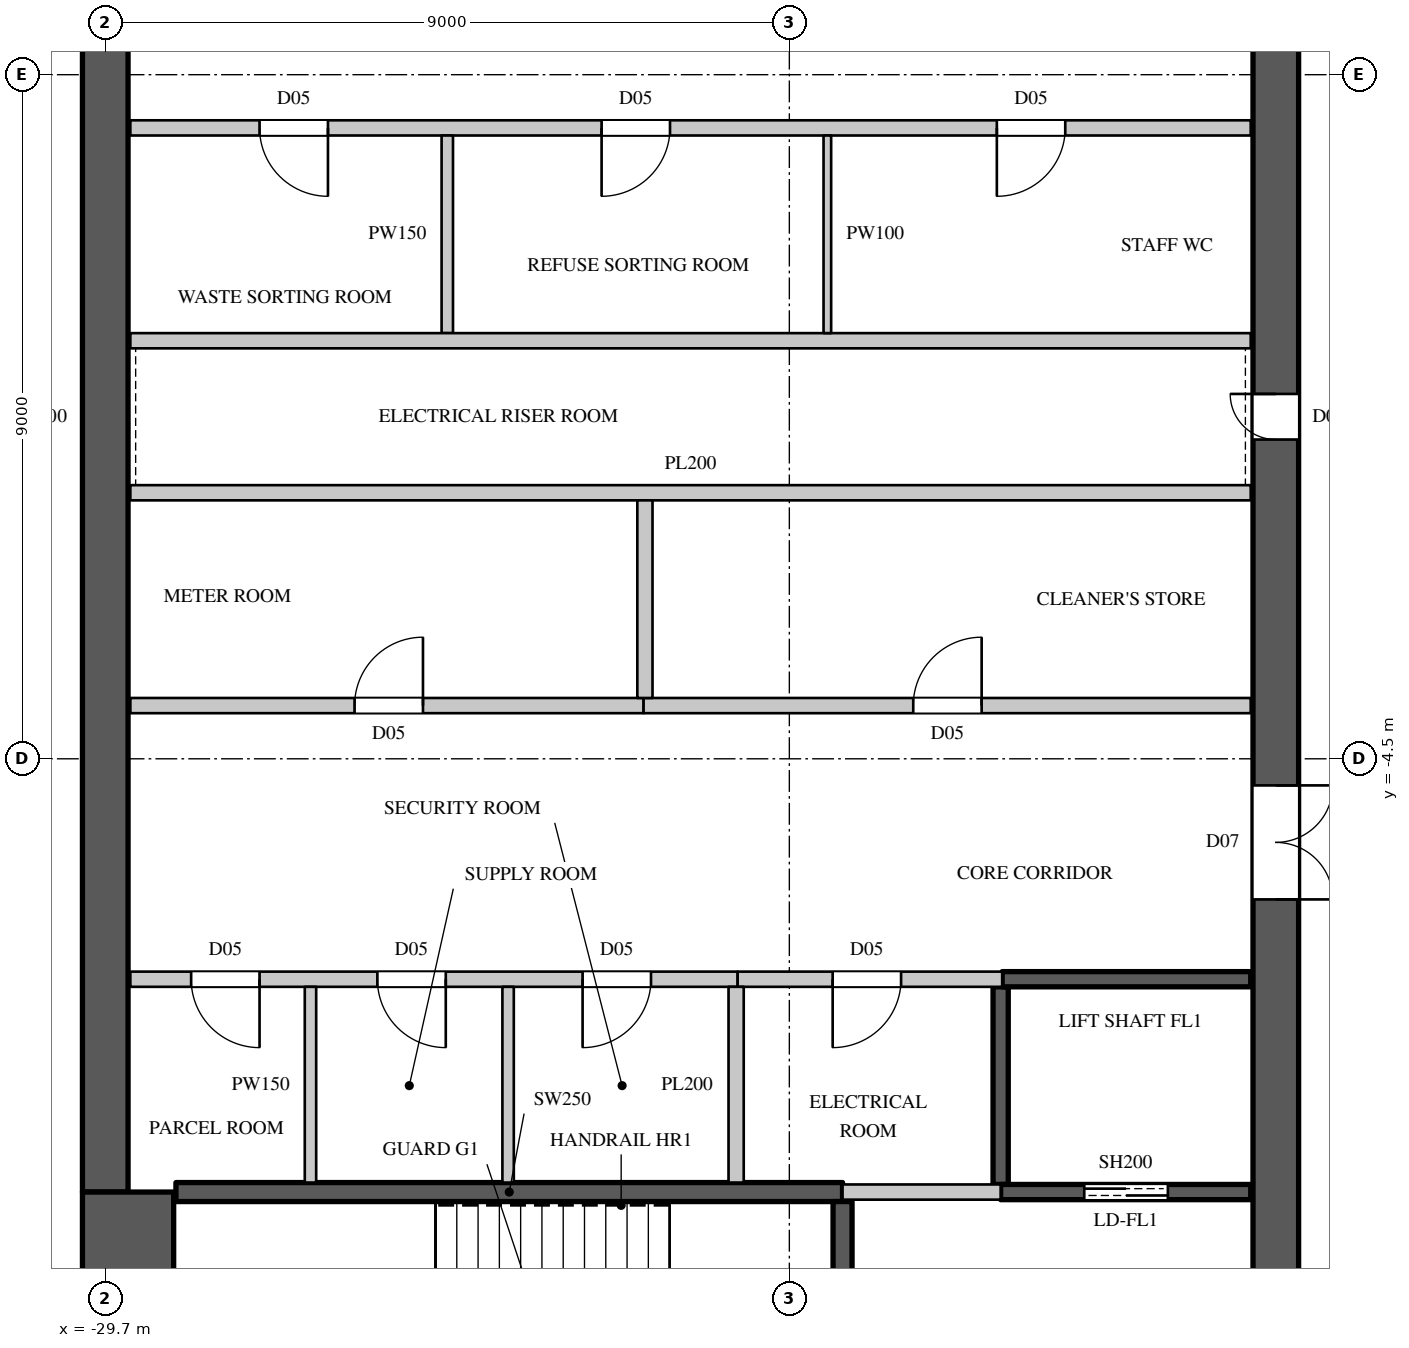
"""IFC4 building model, lengths in metres.
Left out: names, types, materials, properties, quantities, classifications, styles, units other than length and angle.
Written with IfcOpenShell. Run it as: python <this file> out.ifc"""

import sys

from ifc_helpers import new_model, si_unit, direction, frame, frame_2d, origin, place, context, subcontext, project, spatial, rectangle, extrude, element, fill, save


model = new_model("IFC4")
c1 = context("Model", 3, precision=1e-05, world=origin(), true_north=direction((0.0, 1.0)))
c2 = subcontext(c1, "Body", "Model", "MODEL_VIEW")
j1 = project(units=[si_unit("LENGTHUNIT", "METRE"), si_unit("PLANEANGLEUNIT", "RADIAN")], contexts=[c1])
p1 = place(None, origin())
s1 = spatial("IfcSite", under=j1, at=p1, CompositionType="ELEMENT")
p2 = place(p1, origin())
s2 = spatial("IfcBuilding", under=s1, at=p2, CompositionType="ELEMENT")
p3 = place(p2, frame((0.0, 0.0, 335.0)))
s3 = spatial("IfcBuildingStorey", under=s2, at=p3, CompositionType="ELEMENT", Elevation=335.0)
p4 = place(p3, frame((-14.3, -14.8, 0.0), z_axis=(0.0, 0.0, 1.0), x_axis=(0.0, 1.0, 0.0)))
e1 = element("IfcWall", 1, at=p4, inside=s3, PredefinedType="SHEAR", context=c2, shape_type="SweptSolid", body=[
    extrude(rectangle(XDim=29.6, YDim=0.6, at=frame_2d((14.8, 0.0))), origin(), (0.0, 0.0, 1.0), 4.0),
])
p5 = place(p4, frame((1.55, 0.0, 0.0)))
e2 = element("IfcOpeningElement", 2, at=p5, cuts=e1, PredefinedType="OPENING", context=c2, shape_type="SweptSolid", body=[
    extrude(rectangle(XDim=1.5, YDim=2.4, at=frame_2d((0.75, 1.2))), frame((0.0, 0.31, 0.0), z_axis=(0.0, -1.0, 0.0), x_axis=(1.0, 0.0, 0.0)), (0.0, 0.0, 1.0), 0.62),
])
p6 = place(p4, frame((26.55, 0.0, 0.0)))
e3 = element("IfcOpeningElement", 3, at=p6, cuts=e1, PredefinedType="OPENING", context=c2, shape_type="SweptSolid", body=[
    extrude(rectangle(XDim=1.5, YDim=2.4, at=frame_2d((0.75, 1.2))), frame((0.0, 0.31, 0.0), z_axis=(0.0, -1.0, 0.0), x_axis=(1.0, 0.0, 0.0)), (0.0, 0.0, 1.0), 0.62),
])
p7 = place(p4, frame((8.45, 0.0, 0.0)))
e4 = element("IfcOpeningElement", 4, at=p7, cuts=e1, PredefinedType="OPENING", context=c2, shape_type="SweptSolid", body=[
    extrude(rectangle(XDim=1.5, YDim=2.4, at=frame_2d((0.75, 1.2))), frame((0.0, 0.31, 0.0), z_axis=(0.0, -1.0, 0.0), x_axis=(1.0, 0.0, 0.0)), (0.0, 0.0, 1.0), 0.62),
])
p8 = place(p4, frame((19.65, 0.0, 0.0)))
e5 = element("IfcOpeningElement", 5, at=p8, cuts=e1, PredefinedType="OPENING", context=c2, shape_type="SweptSolid", body=[
    extrude(rectangle(XDim=1.5, YDim=2.4, at=frame_2d((0.75, 1.2))), frame((0.0, 0.31, 0.0), z_axis=(0.0, -1.0, 0.0), x_axis=(1.0, 0.0, 0.0)), (0.0, 0.0, 1.0), 0.62),
])
p9 = place(p4, frame((14.5, 0.0, 0.0)))
e6 = element("IfcOpeningElement", 6, at=p9, cuts=e1, PredefinedType="OPENING", context=c2, shape_type="SweptSolid", body=[
    extrude(rectangle(XDim=0.6, YDim=2.0, at=frame_2d((0.3, 1.0))), frame((0.0, 0.31, 0.0), z_axis=(0.0, -1.0, 0.0), x_axis=(1.0, 0.0, 0.0)), (0.0, 0.0, 1.0), 0.62),
])
p10 = place(p3, frame((-29.7, -10.2, 0.0), z_axis=(0.0, 0.0, 1.0), x_axis=(0.0, 1.0, 0.0)))
e7 = element("IfcWall", 7, at=p10, inside=s3, PredefinedType="SHEAR", context=c2, shape_type="SweptSolid", body=[
    extrude(rectangle(XDim=20.4, YDim=0.6, at=frame_2d((10.2, 0.0))), origin(), (0.0, 0.0, 1.0), 4.0),
])
p11 = place(p3, frame((-29.4, -14.8, 0.0), z_axis=(0.0, 0.0, 1.0), x_axis=(0.0, 1.0, 0.0)))
e8 = element("IfcWall", 8, at=p11, inside=s3, PredefinedType="SHEAR", context=c2, shape_type="SweptSolid", body=[
    extrude(rectangle(XDim=4.6, YDim=1.2, at=frame_2d((2.3, 0.0))), origin(), (0.0, 0.0, 1.0), 4.0),
])
p12 = place(p3, frame((-29.37, -7.4, 0.0), z_axis=(0.0, 0.0, 1.0), x_axis=(1.0, 0.0, 0.0)))
e9 = element("IfcWall", 9, at=p12, inside=s3, PredefinedType="PARTITIONING", context=c2, shape_type="SweptSolid", body=[
    extrude(rectangle(XDim=7.99, YDim=0.2, at=frame_2d((3.995, 0.0))), origin(), (0.0, 0.0, 1.0), 3.598),
])
p13 = place(p12, frame((0.8, 0.0, 0.0)))
e10 = element("IfcOpeningElement", 10, at=p13, cuts=e9, PredefinedType="OPENING", context=c2, shape_type="SweptSolid", body=[
    extrude(rectangle(XDim=0.9, YDim=2.2, at=frame_2d((0.45, 1.1))), frame((0.0, 0.11, 0.0), z_axis=(0.0, -1.0, 0.0), x_axis=(1.0, 0.0, 0.0)), (0.0, 0.0, 1.0), 0.22),
])
p14 = place(p12, frame((3.25, 0.0, 0.0)))
e11 = element("IfcOpeningElement", 11, at=p14, cuts=e9, PredefinedType="OPENING", context=c2, shape_type="SweptSolid", body=[
    extrude(rectangle(XDim=0.9, YDim=2.2, at=frame_2d((0.45, 1.1))), frame((0.0, 0.11, 0.0), z_axis=(0.0, -1.0, 0.0), x_axis=(1.0, 0.0, 0.0)), (0.0, 0.0, 1.0), 0.22),
])
p15 = place(p12, frame((5.95, 0.0, 0.0)))
e12 = element("IfcOpeningElement", 12, at=p15, cuts=e9, PredefinedType="OPENING", context=c2, shape_type="SweptSolid", body=[
    extrude(rectangle(XDim=0.9, YDim=2.2, at=frame_2d((0.45, 1.1))), frame((0.0, 0.11, 0.0), z_axis=(0.0, -1.0, 0.0), x_axis=(1.0, 0.0, 0.0)), (0.0, 0.0, 1.0), 0.22),
])
p16 = place(p3, frame((-29.37, 3.8, 0.0), z_axis=(0.0, 0.0, 1.0), x_axis=(1.0, 0.0, 0.0)))
e13 = element("IfcWall", 13, at=p16, inside=s3, PredefinedType="PARTITIONING", context=c2, shape_type="SweptSolid", body=[
    extrude(rectangle(XDim=14.74, YDim=0.2, at=frame_2d((7.37, 0.0))), origin(), (0.0, 0.0, 1.0), 3.598),
])
p17 = place(p16, frame((1.7, 0.0, 0.0)))
e14 = element("IfcOpeningElement", 14, at=p17, cuts=e13, PredefinedType="OPENING", context=c2, shape_type="SweptSolid", body=[
    extrude(rectangle(XDim=0.9, YDim=2.2, at=frame_2d((0.45, 1.1))), frame((0.0, 0.11, 0.0), z_axis=(0.0, -1.0, 0.0), x_axis=(1.0, 0.0, 0.0)), (0.0, 0.0, 1.0), 0.22),
])
p18 = place(p16, frame((6.2, 0.0, 0.0)))
e15 = element("IfcOpeningElement", 15, at=p18, cuts=e13, PredefinedType="OPENING", context=c2, shape_type="SweptSolid", body=[
    extrude(rectangle(XDim=0.9, YDim=2.2, at=frame_2d((0.45, 1.1))), frame((0.0, 0.11, 0.0), z_axis=(0.0, -1.0, 0.0), x_axis=(1.0, 0.0, 0.0)), (0.0, 0.0, 1.0), 0.22),
])
p19 = place(p16, frame((11.4, 0.0, 0.0)))
e16 = element("IfcOpeningElement", 16, at=p19, cuts=e13, PredefinedType="OPENING", context=c2, shape_type="SweptSolid", body=[
    extrude(rectangle(XDim=0.9, YDim=2.2, at=frame_2d((0.45, 1.1))), frame((0.0, 0.11, 0.0), z_axis=(0.0, -1.0, 0.0), x_axis=(1.0, 0.0, 0.0)), (0.0, 0.0, 1.0), 0.22),
])
p20 = place(p3, frame((-22.62, -3.8, 0.0), z_axis=(0.0, 0.0, 1.0), x_axis=(1.0, 0.0, 0.0)))
e17 = element("IfcWall", 17, at=p20, inside=s3, PredefinedType="PARTITIONING", context=c2, shape_type="SweptSolid", body=[
    extrude(rectangle(XDim=7.99, YDim=0.2, at=frame_2d((3.995, 0.0))), origin(), (0.0, 0.0, 1.0), 3.598),
])
p21 = place(p20, frame((3.55, 0.0, 0.0)))
e18 = element("IfcOpeningElement", 18, at=p21, cuts=e17, PredefinedType="OPENING", context=c2, shape_type="SweptSolid", body=[
    extrude(rectangle(XDim=0.9, YDim=2.2, at=frame_2d((0.45, 1.1))), frame((0.0, 0.11, 0.0), z_axis=(0.0, -1.0, 0.0), x_axis=(1.0, 0.0, 0.0)), (0.0, 0.0, 1.0), 0.22),
])
p22 = place(p3, frame((-27.0, -10.075, 0.0), z_axis=(0.0, 0.0, 1.0), x_axis=(0.0, 1.0, 0.0)))
e19 = element("IfcWall", 19, at=p22, inside=s3, PredefinedType="PARTITIONING", context=c2, shape_type="SweptSolid", body=[
    extrude(rectangle(XDim=2.575, YDim=0.15, at=frame_2d((1.288, 0.0))), origin(), (0.0, 0.0, 1.0), 3.598),
])
p23 = place(p3, frame((-25.2, 1.1, 0.0), z_axis=(0.0, 0.0, 1.0), x_axis=(0.0, 1.0, 0.0)))
e20 = element("IfcWall", 20, at=p23, inside=s3, PredefinedType="PARTITIONING", context=c2, shape_type="SweptSolid", body=[
    extrude(rectangle(XDim=2.6, YDim=0.15, at=frame_2d((1.3, 0.0))), origin(), (0.0, 0.0, 1.0), 3.598),
])
p24 = place(p3, frame((-24.4, -10.075, 0.0), z_axis=(0.0, 0.0, 1.0), x_axis=(0.0, 1.0, 0.0)))
e21 = element("IfcWall", 21, at=p24, inside=s3, PredefinedType="PARTITIONING", context=c2, shape_type="SweptSolid", body=[
    extrude(rectangle(XDim=2.575, YDim=0.15, at=frame_2d((1.288, 0.0))), origin(), (0.0, 0.0, 1.0), 3.598),
])
p25 = place(p3, frame((-29.37, -3.8, 0.0), z_axis=(0.0, 0.0, 1.0), x_axis=(1.0, 0.0, 0.0)))
e22 = element("IfcWall", 22, at=p25, inside=s3, PredefinedType="PARTITIONING", context=c2, shape_type="SweptSolid", body=[
    extrude(rectangle(XDim=6.75, YDim=0.2, at=frame_2d((3.375, 0.0))), origin(), (0.0, 0.0, 1.0), 3.598),
])
p26 = place(p25, frame((2.95, 0.0, 0.0)))
e23 = element("IfcOpeningElement", 23, at=p26, cuts=e22, PredefinedType="OPENING", context=c2, shape_type="SweptSolid", body=[
    extrude(rectangle(XDim=0.9, YDim=2.2, at=frame_2d((0.45, 1.1))), frame((0.0, 0.11, 0.0), z_axis=(0.0, -1.0, 0.0), x_axis=(1.0, 0.0, 0.0)), (0.0, 0.0, 1.0), 0.22),
])
for number, where, z_axis, x_axis in (
    (24, (-29.37, -1.0, 0.0), (0.0, 0.0, 1.0), (1.0, 0.0, 0.0)),
    (25, (-29.37, 1.0, 0.0), (0.0, 0.0, 1.0), (1.0, 0.0, 0.0)),
):
    element("IfcWall", number, at=place(p3, frame(where, z_axis=z_axis, x_axis=x_axis)), inside=s3, PredefinedType="PARTITIONING", context=c2, shape_type="SweptSolid", body=[
        extrude(rectangle(XDim=14.74, YDim=0.2, at=frame_2d((7.37, 0.0))), origin(), (0.0, 0.0, 1.0), 3.598),
    ])
p27 = place(p3, frame((-22.6, -3.7, 0.0), z_axis=(0.0, 0.0, 1.0), x_axis=(0.0, 1.0, 0.0)))
e26 = element("IfcWall", 26, at=p27, inside=s3, PredefinedType="PARTITIONING", context=c2, shape_type="SweptSolid", body=[
    extrude(rectangle(XDim=2.6, YDim=0.2, at=frame_2d((1.3, 0.0))), origin(), (0.0, 0.0, 1.0), 3.598),
])
p28 = place(p3, frame((-21.38, -7.4, 0.0), z_axis=(0.0, 0.0, 1.0), x_axis=(1.0, 0.0, 0.0)))
e27 = element("IfcWall", 27, at=p28, inside=s3, PredefinedType="PARTITIONING", context=c2, shape_type="SweptSolid", body=[
    extrude(rectangle(XDim=3.48, YDim=0.2, at=frame_2d((1.74, 0.0))), origin(), (0.0, 0.0, 1.0), 3.598),
])
p29 = place(p28, frame((1.25, 0.0, 0.0)))
e28 = element("IfcOpeningElement", 28, at=p29, cuts=e27, PredefinedType="OPENING", context=c2, shape_type="SweptSolid", body=[
    extrude(rectangle(XDim=0.9, YDim=2.2, at=frame_2d((0.45, 1.1))), frame((0.0, 0.11, 0.0), z_axis=(0.0, -1.0, 0.0), x_axis=(1.0, 0.0, 0.0)), (0.0, 0.0, 1.0), 0.22),
])
p30 = place(p3, frame((-21.4, -10.075, 0.0), z_axis=(0.0, 0.0, 1.0), x_axis=(0.0, 1.0, 0.0)))
e29 = element("IfcWall", 29, at=p30, inside=s3, PredefinedType="PARTITIONING", context=c2, shape_type="SweptSolid", body=[
    extrude(rectangle(XDim=2.575, YDim=0.2, at=frame_2d((1.288, 0.0))), origin(), (0.0, 0.0, 1.0), 3.598),
])
p31 = place(p3, frame((-20.0, -10.2, 0.0), z_axis=(0.0, 0.0, 1.0), x_axis=(1.0, 0.0, 0.0)))
e30 = element("IfcWall", 30, at=p31, inside=s3, PredefinedType="PARTITIONING", context=c2, shape_type="SweptSolid", body=[
    extrude(rectangle(XDim=2.08, YDim=0.2, at=frame_2d((1.04, 0.0))), origin(), (0.0, 0.0, 1.0), 3.598),
])
p32 = place(p3, frame((-17.92, -10.1, 0.0), z_axis=(0.0, 0.0, 1.0), x_axis=(0.0, 1.0, 0.0)))
e31 = element("IfcWall", 31, at=p32, inside=s3, PredefinedType="SHEAR", context=c2, shape_type="SweptSolid", body=[
    extrude(rectangle(XDim=2.6, YDim=0.2, at=frame_2d((1.3, 0.0))), origin(), (0.0, 0.0, 1.0), 3.598),
])
p33 = place(p3, frame((-17.92, -10.2, 0.0), z_axis=(0.0, 0.0, 1.0), x_axis=(1.0, 0.0, 0.0)))
e32 = element("IfcWall", 32, at=p33, inside=s3, PredefinedType="SHEAR", context=c2, shape_type="SweptSolid", body=[
    extrude(rectangle(XDim=3.29, YDim=0.2, at=frame_2d((1.645, 0.0))), origin(), (0.0, 0.0, 1.0), 3.598),
])
p34 = place(p33, frame((1.1, 0.0, 0.0)))
e33 = element("IfcOpeningElement", 33, at=p34, cuts=e32, PredefinedType="OPENING", context=c2, shape_type="SweptSolid", body=[
    extrude(rectangle(XDim=1.1, YDim=2.2, at=frame_2d((0.55, 1.1))), frame((0.0, 0.11, 0.0), z_axis=(0.0, -1.0, 0.0), x_axis=(1.0, 0.0, 0.0)), (0.0, 0.0, 1.0), 0.22),
])
p35 = place(p3, frame((-17.9, -7.4, 0.0), z_axis=(0.0, 0.0, 1.0), x_axis=(1.0, 0.0, 0.0)))
e34 = element("IfcWall", 34, at=p35, inside=s3, PredefinedType="SHEAR", context=c2, shape_type="SweptSolid", body=[
    extrude(rectangle(XDim=3.27, YDim=0.2, at=frame_2d((1.635, 0.0))), origin(), (0.0, 0.0, 1.0), 3.598),
])
p36 = place(p3, frame((-28.77, -10.2, 0.0), z_axis=(0.0, 0.0, 1.0), x_axis=(1.0, 0.0, 0.0)))
e35 = element("IfcWall", 35, at=p36, inside=s3, PredefinedType="SHEAR", context=c2, shape_type="SweptSolid", body=[
    extrude(rectangle(XDim=8.77, YDim=0.25, at=frame_2d((4.385, 0.0))), origin(), (0.0, 0.0, 1.0), 3.598),
])
p37 = place(p3, frame((-20.0, -14.77, 0.0), z_axis=(0.0, 0.0, 1.0), x_axis=(0.0, 1.0, 0.0)))
e36 = element("IfcWall", 36, at=p37, inside=s3, PredefinedType="SHEAR", context=c2, shape_type="SweptSolid", body=[
    extrude(rectangle(XDim=4.445, YDim=0.25, at=frame_2d((2.223, 0.0))), origin(), (0.0, 0.0, 1.0), 3.598),
])
p38 = place(p37, frame((1.7, 0.0, 0.0)))
e37 = element("IfcOpeningElement", 37, at=p38, cuts=e36, PredefinedType="OPENING", context=c2, shape_type="SweptSolid", body=[
    extrude(rectangle(XDim=1.1, YDim=2.2, at=frame_2d((0.55, 1.1))), frame((0.0, 0.135, 0.0), z_axis=(0.0, -1.0, 0.0), x_axis=(1.0, 0.0, 0.0)), (0.0, 0.0, 1.0), 0.27),
])
p39 = place(p3, frame((-20.2, 1.1, 0.0), z_axis=(0.0, 0.0, 1.0), x_axis=(0.0, 1.0, 0.0)))
e38 = element("IfcWall", 38, at=p39, inside=s3, PredefinedType="PARTITIONING", context=c2, shape_type="SweptSolid", body=[
    extrude(rectangle(XDim=2.6, YDim=0.1, at=frame_2d((1.3, 0.0))), origin(), (0.0, 0.0, 1.0), 3.598),
])
p40 = place(p13, origin())
e39 = element("IfcDoor", 39, at=p40, inside=s3, OperationType="SINGLE_SWING_LEFT", PredefinedType="DOOR", context=c2, shape_type="SweptSolid", body=[
    extrude(rectangle(XDim=0.9, YDim=2.2, at=frame_2d((0.45, 1.1))), frame((0.0, 0.025, 0.0), z_axis=(0.0, -1.0, 0.0), x_axis=(1.0, 0.0, 0.0)), (0.0, 0.0, 1.0), 0.05),
])
fill(e10, e39)
p41 = place(p14, origin())
e40 = element("IfcDoor", 40, at=p41, inside=s3, OperationType="SINGLE_SWING_LEFT", PredefinedType="DOOR", context=c2, shape_type="SweptSolid", body=[
    extrude(rectangle(XDim=0.9, YDim=2.2, at=frame_2d((0.45, 1.1))), frame((0.0, 0.025, 0.0), z_axis=(0.0, -1.0, 0.0), x_axis=(1.0, 0.0, 0.0)), (0.0, 0.0, 1.0), 0.05),
])
fill(e11, e40)
p42 = place(p15, origin())
e41 = element("IfcDoor", 41, at=p42, inside=s3, OperationType="SINGLE_SWING_RIGHT", PredefinedType="DOOR", context=c2, shape_type="SweptSolid", body=[
    extrude(rectangle(XDim=0.9, YDim=2.2, at=frame_2d((0.45, 1.1))), frame((0.0, 0.025, 0.0), z_axis=(0.0, -1.0, 0.0), x_axis=(1.0, 0.0, 0.0)), (0.0, 0.0, 1.0), 0.05),
])
fill(e12, e41)
p43 = place(p29, origin())
e42 = element("IfcDoor", 42, at=p43, inside=s3, OperationType="SINGLE_SWING_RIGHT", PredefinedType="DOOR", context=c2, shape_type="SweptSolid", body=[
    extrude(rectangle(XDim=0.9, YDim=2.2, at=frame_2d((0.45, 1.1))), frame((0.0, 0.025, 0.0), z_axis=(0.0, -1.0, 0.0), x_axis=(1.0, 0.0, 0.0)), (0.0, 0.0, 1.0), 0.05),
])
fill(e28, e42)
p44 = place(p26, origin())
e43 = element("IfcDoor", 43, at=p44, inside=s3, OperationType="SINGLE_SWING_RIGHT", PredefinedType="DOOR", context=c2, shape_type="SweptSolid", body=[
    extrude(rectangle(XDim=0.9, YDim=2.2, at=frame_2d((0.45, 1.1))), frame((0.0, 0.025, 0.0), z_axis=(0.0, -1.0, 0.0), x_axis=(1.0, 0.0, 0.0)), (0.0, 0.0, 1.0), 0.05),
])
fill(e23, e43)
p45 = place(p21, origin())
e44 = element("IfcDoor", 44, at=p45, inside=s3, OperationType="SINGLE_SWING_RIGHT", PredefinedType="DOOR", context=c2, shape_type="SweptSolid", body=[
    extrude(rectangle(XDim=0.9, YDim=2.2, at=frame_2d((0.45, 1.1))), frame((0.0, 0.025, 0.0), z_axis=(0.0, -1.0, 0.0), x_axis=(1.0, 0.0, 0.0)), (0.0, 0.0, 1.0), 0.05),
])
fill(e18, e44)
p46 = place(p17, origin())
e45 = element("IfcDoor", 45, at=p46, inside=s3, OperationType="SINGLE_SWING_LEFT", PredefinedType="DOOR", context=c2, shape_type="SweptSolid", body=[
    extrude(rectangle(XDim=0.9, YDim=2.2, at=frame_2d((0.45, 1.1))), frame((0.0, 0.025, 0.0), z_axis=(0.0, -1.0, 0.0), x_axis=(1.0, 0.0, 0.0)), (0.0, 0.0, 1.0), 0.05),
])
fill(e14, e45)
p47 = place(p18, origin())
e46 = element("IfcDoor", 46, at=p47, inside=s3, OperationType="SINGLE_SWING_RIGHT", PredefinedType="DOOR", context=c2, shape_type="SweptSolid", body=[
    extrude(rectangle(XDim=0.9, YDim=2.2, at=frame_2d((0.45, 1.1))), frame((0.0, 0.025, 0.0), z_axis=(0.0, -1.0, 0.0), x_axis=(1.0, 0.0, 0.0)), (0.0, 0.0, 1.0), 0.05),
])
fill(e15, e46)
p48 = place(p19, origin())
e47 = element("IfcDoor", 47, at=p48, inside=s3, OperationType="SINGLE_SWING_RIGHT", PredefinedType="DOOR", context=c2, shape_type="SweptSolid", body=[
    extrude(rectangle(XDim=0.9, YDim=2.2, at=frame_2d((0.45, 1.1))), frame((0.0, 0.025, 0.0), z_axis=(0.0, -1.0, 0.0), x_axis=(1.0, 0.0, 0.0)), (0.0, 0.0, 1.0), 0.05),
])
fill(e16, e47)
p49 = place(p34, origin())
e48 = element("IfcDoor", 48, at=p49, inside=s3, OperationType="DOUBLE_DOOR_SLIDING", PredefinedType="DOOR", context=c2, shape_type="SweptSolid", body=[
    extrude(rectangle(XDim=1.1, YDim=2.2, at=frame_2d((0.55, 1.1))), frame((0.0, 0.025, 0.0), z_axis=(0.0, -1.0, 0.0), x_axis=(1.0, 0.0, 0.0)), (0.0, 0.0, 1.0), 0.05),
])
fill(e33, e48)
p50 = place(p7, origin())
e49 = element("IfcDoor", 49, at=p50, inside=s3, OperationType="DOUBLE_DOOR_SINGLE_SWING", PredefinedType="DOOR", context=c2, shape_type="SweptSolid", body=[
    extrude(rectangle(XDim=1.5, YDim=2.4, at=frame_2d((0.75, 1.2))), frame((0.0, -0.245, 0.0), z_axis=(0.0, -1.0, 0.0), x_axis=(1.0, 0.0, 0.0)), (0.0, 0.0, 1.0), 0.05),
])
fill(e4, e49)
p51 = place(p9, origin())
e50 = element("IfcDoor", 50, at=p51, inside=s3, OperationType="SINGLE_SWING_RIGHT", PredefinedType="DOOR", context=c2, shape_type="SweptSolid", body=[
    extrude(rectangle(XDim=0.6, YDim=2.0, at=frame_2d((0.3, 1.0))), frame((0.0, 0.295, 0.0), z_axis=(0.0, -1.0, 0.0), x_axis=(1.0, 0.0, 0.0)), (0.0, 0.0, 1.0), 0.05),
])
fill(e6, e50)
save(model, sys.argv[1])
